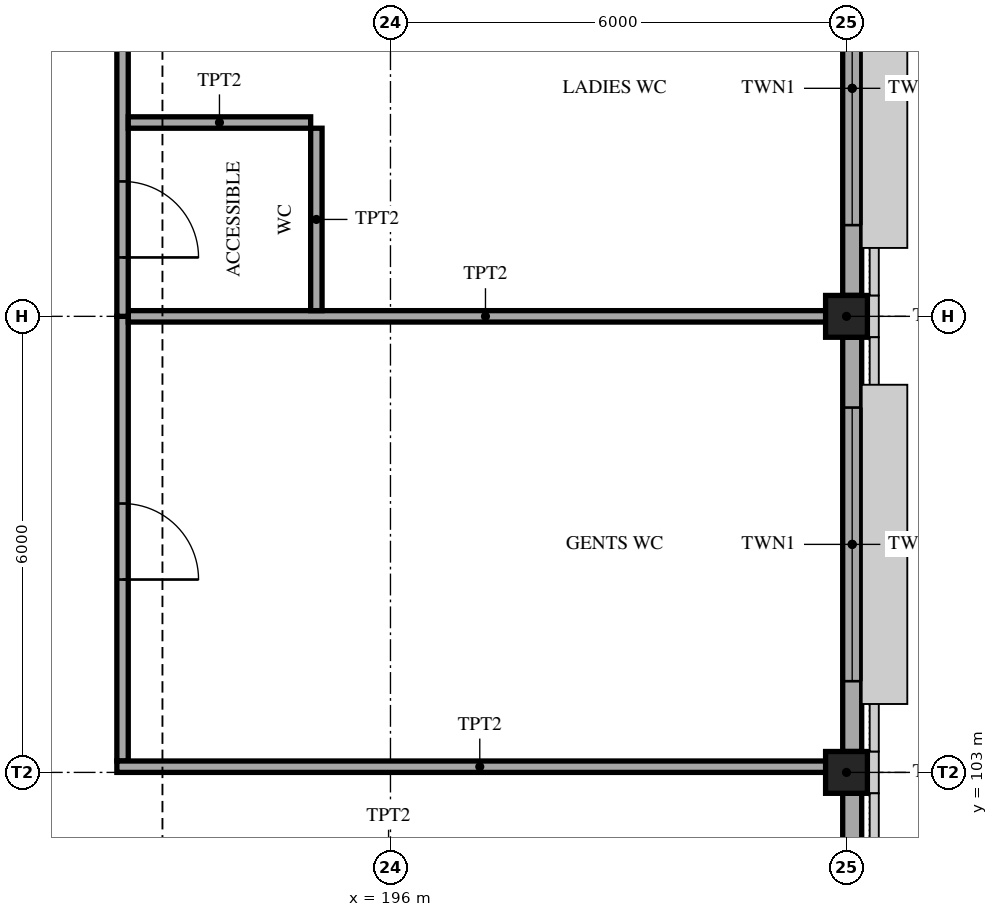
"""IFC4 building model, lengths in metres.
Left out: names, types, materials, properties, quantities, classifications, styles, units other than length and angle.
Written with IfcOpenShell. Run it as: python <this file> out.ifc"""

import sys

from ifc_helpers import new_model, si_unit, direction, frame, frame_2d, origin, origin_2d, place, context, subcontext, project, spatial, polyline, rectangle, hollow_rectangle, outline, extrude, element, fill, save


model = new_model("IFC4")
c1 = context("Model", 3, precision=1e-05, world=origin(), true_north=direction((0.0, 1.0)))
c2 = subcontext(c1, "Body", "Model", "MODEL_VIEW")
j1 = project(units=[si_unit("LENGTHUNIT", "METRE"), si_unit("PLANEANGLEUNIT", "RADIAN")], contexts=[c1])
p1 = place(None, origin())
s1 = spatial("IfcSite", under=j1, at=p1, CompositionType="ELEMENT")
p2 = place(p1, origin())
s2 = spatial("IfcBuilding", under=s1, at=p2, CompositionType="ELEMENT")
p3 = place(p2, frame((0.0, 0.0, 15.0)))
s3 = spatial("IfcBuildingStorey", under=s2, at=p3, CompositionType="ELEMENT", Elevation=15.0)
for number, where, z_axis, x_axis in (
    (1, (202.0, 103.0, 0.0), (0.0, 0.0, 1.0), (1.0, 0.0, 0.0)),
    (2, (202.0, 109.0, 0.0), (0.0, 0.0, 1.0), (1.0, 0.0, 0.0)),
):
    element("IfcColumn", number, at=place(p3, frame(where, z_axis=z_axis, x_axis=x_axis)), inside=s3, PredefinedType="COLUMN", context=c2, shape_type="SweptSolid", body=[
        extrude(hollow_rectangle(XDim=0.55, YDim=0.55, WallThickness=0.032, at=origin_2d()), origin(), (0.0, 0.0, 1.0), 4.2),
    ])
p4 = place(p3, frame((202.075, 97.275, 0.0), z_axis=(0.0, 0.0, 1.0), x_axis=(0.0, 1.0, 0.0)))
e3 = element("IfcWall", 3, at=p4, inside=s3, PredefinedType="SOLIDWALL", context=c2, shape_type="SweptSolid", body=[
    extrude(rectangle(XDim=5.45, YDim=0.25, at=frame_2d((2.725, 0.0))), origin(), (0.0, 0.0, 1.0), 3.55),
])
p5 = place(p4, frame((0.925, 0.0, 0.9)))
e4 = element("IfcOpeningElement", 4, at=p5, cuts=e3, PredefinedType="OPENING", context=c2, shape_type="SweptSolid", body=[
    extrude(rectangle(XDim=3.6, YDim=2.4, at=frame_2d((1.8, 1.2))), frame((0.0, 0.135, 0.0), z_axis=(0.0, -1.0, 0.0), x_axis=(1.0, 0.0, 0.0)), (0.0, 0.0, 1.0), 0.27),
])
p6 = place(p3, frame((202.075, 103.275, 0.0), z_axis=(0.0, 0.0, 1.0), x_axis=(0.0, 1.0, 0.0)))
e5 = element("IfcWall", 5, at=p6, inside=s3, PredefinedType="SOLIDWALL", context=c2, shape_type="SweptSolid", body=[
    extrude(rectangle(XDim=5.45, YDim=0.25, at=frame_2d((2.725, 0.0))), origin(), (0.0, 0.0, 1.0), 3.55),
])
p7 = place(p6, frame((0.925, 0.0, 0.9)))
e6 = element("IfcOpeningElement", 6, at=p7, cuts=e5, PredefinedType="OPENING", context=c2, shape_type="SweptSolid", body=[
    extrude(rectangle(XDim=3.6, YDim=2.4, at=frame_2d((1.8, 1.2))), frame((0.0, 0.135, 0.0), z_axis=(0.0, -1.0, 0.0), x_axis=(1.0, 0.0, 0.0)), (0.0, 0.0, 1.0), 0.27),
])
p8 = place(p3, frame((202.075, 109.275, 0.0), z_axis=(0.0, 0.0, 1.0), x_axis=(0.0, 1.0, 0.0)))
e7 = element("IfcWall", 7, at=p8, inside=s3, PredefinedType="SOLIDWALL", context=c2, shape_type="SweptSolid", body=[
    extrude(rectangle(XDim=5.45, YDim=0.25, at=frame_2d((2.725, 0.0))), origin(), (0.0, 0.0, 1.0), 3.55),
])
p9 = place(p8, frame((0.925, 0.0, 0.9)))
e8 = element("IfcOpeningElement", 8, at=p9, cuts=e7, PredefinedType="OPENING", context=c2, shape_type="SweptSolid", body=[
    extrude(rectangle(XDim=3.6, YDim=2.4, at=frame_2d((1.8, 1.2))), frame((0.0, 0.135, 0.0), z_axis=(0.0, -1.0, 0.0), x_axis=(1.0, 0.0, 0.0)), (0.0, 0.0, 1.0), 0.27),
])
p10 = place(p3, frame((192.475, 103.15, 0.0), z_axis=(0.0, 0.0, 1.0), x_axis=(0.0, 1.0, 0.0)))
e9 = element("IfcWall", 9, at=p10, inside=s3, PredefinedType="PARTITIONING", context=c2, shape_type="SweptSolid", body=[
    extrude(rectangle(XDim=5.85, YDim=0.15, at=frame_2d((2.925, 0.0))), origin(), (0.0, 0.0, 1.0), 3.4),
])
p11 = place(p10, frame((2.387, 0.0, 0.0)))
e10 = element("IfcOpeningElement", 10, at=p11, cuts=e9, PredefinedType="OPENING", context=c2, shape_type="SweptSolid", body=[
    extrude(rectangle(XDim=1.0, YDim=2.1, at=frame_2d((0.5, 1.05))), frame((0.0, 0.085, 0.0), z_axis=(0.0, -1.0, 0.0), x_axis=(1.0, 0.0, 0.0)), (0.0, 0.0, 1.0), 0.17),
])
p12 = place(p3, frame((192.55, 109.0, 0.0), z_axis=(0.0, 0.0, 1.0), x_axis=(1.0, 0.0, 0.0)))
e11 = element("IfcWall", 11, at=p12, inside=s3, PredefinedType="PARTITIONING", context=c2, shape_type="SweptSolid", body=[
    extrude(rectangle(XDim=9.4, YDim=0.15, at=frame_2d((4.7, 0.0))), origin(), (0.0, 0.0, 1.0), 3.4),
])
p13 = place(p3, frame((192.475, 109.0, 0.0), z_axis=(0.0, 0.0, 1.0), x_axis=(0.0, 1.0, 0.0)))
e12 = element("IfcWall", 12, at=p13, inside=s3, PredefinedType="PARTITIONING", context=c2, shape_type="SweptSolid", body=[
    extrude(rectangle(XDim=6.0, YDim=0.15, at=frame_2d((3.0, 0.0))), origin(), (0.0, 0.0, 1.0), 3.4),
])
p14 = place(p13, frame((3.7, 0.0, 0.0)))
e13 = element("IfcOpeningElement", 13, at=p14, cuts=e12, PredefinedType="OPENING", context=c2, shape_type="SweptSolid", body=[
    extrude(rectangle(XDim=1.0, YDim=2.1, at=frame_2d((0.5, 1.05))), frame((0.0, 0.085, 0.0), z_axis=(0.0, -1.0, 0.0), x_axis=(1.0, 0.0, 0.0)), (0.0, 0.0, 1.0), 0.17),
])
p15 = place(p13, frame((0.775, 0.0, 0.0)))
e14 = element("IfcOpeningElement", 14, at=p15, cuts=e12, PredefinedType="OPENING", context=c2, shape_type="SweptSolid", body=[
    extrude(rectangle(XDim=1.0, YDim=2.1, at=frame_2d((0.5, 1.05))), frame((0.0, 0.085, 0.0), z_axis=(0.0, -1.0, 0.0), x_axis=(1.0, 0.0, 0.0)), (0.0, 0.0, 1.0), 0.17),
])
p16 = place(p3, frame((195.025, 109.075, 0.0), z_axis=(0.0, 0.0, 1.0), x_axis=(0.0, 1.0, 0.0)))
e15 = element("IfcWall", 15, at=p16, inside=s3, PredefinedType="PARTITIONING", context=c2, shape_type="SweptSolid", body=[
    extrude(rectangle(XDim=2.4, YDim=0.15, at=frame_2d((1.2, 0.0))), origin(), (0.0, 0.0, 1.0), 3.4),
])
p17 = place(p3, frame((192.55, 111.55, 0.0), z_axis=(0.0, 0.0, 1.0), x_axis=(1.0, 0.0, 0.0)))
e16 = element("IfcWall", 16, at=p17, inside=s3, PredefinedType="PARTITIONING", context=c2, shape_type="SweptSolid", body=[
    extrude(rectangle(XDim=2.4, YDim=0.15, at=frame_2d((1.2, 0.0))), origin(), (0.0, 0.0, 1.0), 3.65),
])
p18 = place(p3, frame((192.4, 103.075, 0.0), z_axis=(0.0, 0.0, 1.0), x_axis=(1.0, 0.0, 0.0)))
e17 = element("IfcWall", 17, at=p18, inside=s3, PredefinedType="PARTITIONING", context=c2, shape_type="SweptSolid", body=[
    extrude(rectangle(XDim=9.55, YDim=0.15, at=frame_2d((4.775, 0.0))), origin(), (0.0, 0.0, 1.0), 3.4),
])
p19 = place(p7, origin())
e18 = element("IfcWindow", 18, at=p19, inside=s3, PartitioningType="TRIPLE_PANEL_VERTICAL", PredefinedType="WINDOW", context=c2, shape_type="SweptSolid", body=[
    extrude(outline(polyline([(0.0, 0.0), (3.6, 0.0), (3.6, 2.4), (0.0, 2.4), (0.0, 0.0)]), holes=[polyline([(0.06, 0.06), (0.96, 0.06), (0.96, 2.34), (0.06, 2.34), (0.06, 0.06)]), polyline([(1.06, 0.06), (2.54, 0.06), (2.54, 2.34), (1.06, 2.34), (1.06, 0.06)]), polyline([(2.64, 0.06), (3.54, 0.06), (3.54, 2.34), (2.64, 2.34), (2.64, 0.06)])]), frame((0.0, 0.03, 0.0), z_axis=(0.0, -1.0, 0.0), x_axis=(1.0, 0.0, 0.0)), (0.0, 0.0, 1.0), 0.06),
    extrude(rectangle(XDim=0.924, YDim=2.304, at=frame_2d((0.51, 1.2))), frame((0.0, 0.01, 0.0), z_axis=(0.0, -1.0, 0.0), x_axis=(1.0, 0.0, 0.0)), (0.0, 0.0, 1.0), 0.02),
    extrude(rectangle(XDim=1.504, YDim=2.304, at=frame_2d((1.8, 1.2))), frame((0.0, 0.01, 0.0), z_axis=(0.0, -1.0, 0.0), x_axis=(1.0, 0.0, 0.0)), (0.0, 0.0, 1.0), 0.02),
    extrude(rectangle(XDim=0.924, YDim=2.304, at=frame_2d((3.09, 1.2))), frame((0.0, 0.01, 0.0), z_axis=(0.0, -1.0, 0.0), x_axis=(1.0, 0.0, 0.0)), (0.0, 0.0, 1.0), 0.02),
])
fill(e6, e18)
p20 = place(p9, origin())
e19 = element("IfcWindow", 19, at=p20, inside=s3, PartitioningType="TRIPLE_PANEL_VERTICAL", PredefinedType="WINDOW", context=c2, shape_type="SweptSolid", body=[
    extrude(outline(polyline([(0.0, 0.0), (3.6, 0.0), (3.6, 2.4), (0.0, 2.4), (0.0, 0.0)]), holes=[polyline([(0.06, 0.06), (0.96, 0.06), (0.96, 2.34), (0.06, 2.34), (0.06, 0.06)]), polyline([(1.06, 0.06), (2.54, 0.06), (2.54, 2.34), (1.06, 2.34), (1.06, 0.06)]), polyline([(2.64, 0.06), (3.54, 0.06), (3.54, 2.34), (2.64, 2.34), (2.64, 0.06)])]), frame((0.0, 0.03, 0.0), z_axis=(0.0, -1.0, 0.0), x_axis=(1.0, 0.0, 0.0)), (0.0, 0.0, 1.0), 0.06),
    extrude(rectangle(XDim=0.924, YDim=2.304, at=frame_2d((0.51, 1.2))), frame((0.0, 0.01, 0.0), z_axis=(0.0, -1.0, 0.0), x_axis=(1.0, 0.0, 0.0)), (0.0, 0.0, 1.0), 0.02),
    extrude(rectangle(XDim=1.504, YDim=2.304, at=frame_2d((1.8, 1.2))), frame((0.0, 0.01, 0.0), z_axis=(0.0, -1.0, 0.0), x_axis=(1.0, 0.0, 0.0)), (0.0, 0.0, 1.0), 0.02),
    extrude(rectangle(XDim=0.924, YDim=2.304, at=frame_2d((3.09, 1.2))), frame((0.0, 0.01, 0.0), z_axis=(0.0, -1.0, 0.0), x_axis=(1.0, 0.0, 0.0)), (0.0, 0.0, 1.0), 0.02),
])
fill(e8, e19)
p21 = place(p11, frame((1.0, 0.0, 0.0), z_axis=(0.0, 0.0, 1.0), x_axis=(-1.0, 0.0, 0.0)))
e20 = element("IfcDoor", 20, at=p21, inside=s3, OperationType="SINGLE_SWING_RIGHT", PredefinedType="DOOR", context=c2, shape_type="SweptSolid", body=[
    extrude(rectangle(XDim=1.0, YDim=2.1, at=frame_2d((0.5, 1.05))), frame((0.0, 0.025, 0.0), z_axis=(0.0, -1.0, 0.0), x_axis=(1.0, 0.0, 0.0)), (0.0, 0.0, 1.0), 0.05),
])
fill(e10, e20)
p22 = place(p15, frame((1.0, 0.0, 0.0), z_axis=(0.0, 0.0, 1.0), x_axis=(-1.0, 0.0, 0.0)))
e21 = element("IfcDoor", 21, at=p22, inside=s3, OperationType="SINGLE_SWING_RIGHT", PredefinedType="DOOR", context=c2, shape_type="SweptSolid", body=[
    extrude(rectangle(XDim=1.0, YDim=2.1, at=frame_2d((0.5, 1.05))), frame((0.0, 0.025, 0.0), z_axis=(0.0, -1.0, 0.0), x_axis=(1.0, 0.0, 0.0)), (0.0, 0.0, 1.0), 0.05),
])
fill(e14, e21)
save(model, sys.argv[1])
